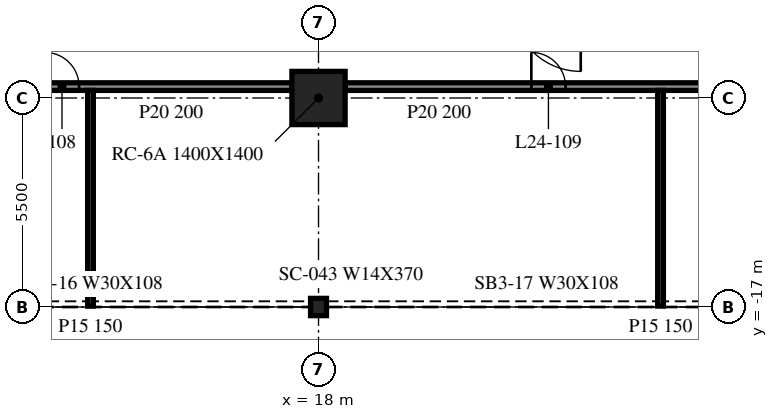
"""IFC4 building model, lengths in metres.
Left out: names, types, materials, properties, quantities, classifications, styles, units other than length and angle.
Written with IfcOpenShell. Run it as: python <this file> out.ifc"""

import sys

from ifc_helpers import new_model, si_unit, direction, frame, frame_2d, origin, origin_2d, place, context, subcontext, project, spatial, rectangle, i_section, extrude, element, fill, save


model = new_model("IFC4")
c1 = context("Model", 3, precision=1e-05, world=origin(), true_north=direction((0.0, 1.0)))
c2 = subcontext(c1, "Body", "Model", "MODEL_VIEW")
j1 = project(units=[si_unit("LENGTHUNIT", "METRE"), si_unit("PLANEANGLEUNIT", "RADIAN")], contexts=[c1])
p1 = place(None, origin())
s1 = spatial("IfcSite", under=j1, at=p1, CompositionType="ELEMENT")
p2 = place(p1, origin())
s2 = spatial("IfcBuilding", under=s1, at=p2, CompositionType="ELEMENT")
p3 = place(p2, frame((0.0, 0.0, 105.3)))
s3 = spatial("IfcBuildingStorey", under=s2, at=p3, CompositionType="ELEMENT", Elevation=105.3)
p4 = place(p3, frame((18.0, -11.5, -0.34), z_axis=(0.0, 0.0, 1.0), x_axis=(1.0, 0.0, 0.0)))
e1 = element("IfcColumn", 1, at=p4, inside=s3, PredefinedType="COLUMN", context=c2, shape_type="SweptSolid", body=[
    extrude(rectangle(XDim=1.4, YDim=1.4, at=origin_2d()), origin(), (0.0, 0.0, 1.0), 4.1),
])
p5 = place(p3, frame((18.0, -17.0, -0.34), z_axis=(0.0, 0.0, 1.0), x_axis=(1.0, 0.0, 0.0)))
e2 = element("IfcColumn", 2, at=p5, inside=s3, PredefinedType="COLUMN", context=c2, shape_type="SweptSolid", body=[
    extrude(i_section(OverallWidth=0.419, OverallDepth=0.455, WebThickness=0.042, FlangeThickness=0.068, at=origin_2d()), origin(), (0.0, 0.0, 1.0), 4.1),
])
p6 = place(p3, frame((6.7, -11.2, 0.0), z_axis=(0.0, 0.0, 1.0), x_axis=(1.0, 0.0, 0.0)))
e3 = element("IfcWall", 3, at=p6, inside=s3, PredefinedType="PARTITIONING", context=c2, shape_type="SweptSolid", body=[
    extrude(rectangle(XDim=10.6, YDim=0.2, at=frame_2d((5.3, 0.0))), origin(), (0.0, 0.0, 1.0), 3.76),
])
p7 = place(p6, frame((1.1, 0.0, 0.0)))
e4 = element("IfcOpeningElement", 4, at=p7, cuts=e3, PredefinedType="OPENING", context=c2, shape_type="SweptSolid", body=[
    extrude(rectangle(XDim=0.9, YDim=2.1, at=frame_2d((0.45, 1.05))), frame((0.0, 0.11, 0.0), z_axis=(0.0, -1.0, 0.0), x_axis=(1.0, 0.0, 0.0)), (0.0, 0.0, 1.0), 0.22),
])
p8 = place(p6, frame((4.1, 0.0, 0.0)))
e5 = element("IfcOpeningElement", 5, at=p8, cuts=e3, PredefinedType="OPENING", context=c2, shape_type="SweptSolid", body=[
    extrude(rectangle(XDim=0.9, YDim=2.1, at=frame_2d((0.45, 1.05))), frame((0.0, 0.11, 0.0), z_axis=(0.0, -1.0, 0.0), x_axis=(1.0, 0.0, 0.0)), (0.0, 0.0, 1.0), 0.22),
])
p9 = place(p3, frame((18.7, -11.2, 0.0), z_axis=(0.0, 0.0, 1.0), x_axis=(1.0, 0.0, 0.0)))
e6 = element("IfcWall", 6, at=p9, inside=s3, PredefinedType="PARTITIONING", context=c2, shape_type="SweptSolid", body=[
    extrude(rectangle(XDim=10.6, YDim=0.2, at=frame_2d((5.3, 0.0))), origin(), (0.0, 0.0, 1.0), 3.76),
])
p10 = place(p9, frame((4.9, 0.0, 0.0)))
e7 = element("IfcOpeningElement", 7, at=p10, cuts=e6, PredefinedType="OPENING", context=c2, shape_type="SweptSolid", body=[
    extrude(rectangle(XDim=0.9, YDim=2.1, at=frame_2d((0.45, 1.05))), frame((0.0, 0.11, 0.0), z_axis=(0.0, -1.0, 0.0), x_axis=(1.0, 0.0, 0.0)), (0.0, 0.0, 1.0), 0.22),
])
for number, where, z_axis, x_axis in (
    (8, (12.0, -16.975, 0.0), (0.0, 0.0, 1.0), (0.0, 1.0, 0.0)),
    (9, (27.0, -16.975, 0.0), (0.0, 0.0, 1.0), (0.0, 1.0, 0.0)),
):
    element("IfcWall", number, at=place(p3, frame(where, z_axis=z_axis, x_axis=x_axis)), inside=s3, PredefinedType="PARTITIONING", context=c2, shape_type="SweptSolid", body=[
        extrude(rectangle(XDim=5.675, YDim=0.15, at=frame_2d((2.837, 0.0))), origin(), (0.0, 0.0, 1.0), 3.76),
    ])
p11 = place(p8, origin())
e10 = element("IfcDoor", 10, at=p11, inside=s3, OperationType="SINGLE_SWING_RIGHT", PredefinedType="DOOR", context=c2, shape_type="SweptSolid", body=[
    extrude(rectangle(XDim=0.9, YDim=2.1, at=frame_2d((0.45, 1.05))), frame((0.0, 0.025, 0.0), z_axis=(0.0, -1.0, 0.0), x_axis=(1.0, 0.0, 0.0)), (0.0, 0.0, 1.0), 0.05),
])
fill(e5, e10)
p12 = place(p10, origin())
e11 = element("IfcDoor", 11, at=p12, inside=s3, OperationType="SINGLE_SWING_LEFT", PredefinedType="DOOR", context=c2, shape_type="SweptSolid", body=[
    extrude(rectangle(XDim=0.9, YDim=2.1, at=frame_2d((0.45, 1.05))), frame((0.0, 0.025, 0.0), z_axis=(0.0, -1.0, 0.0), x_axis=(1.0, 0.0, 0.0)), (0.0, 0.0, 1.0), 0.05),
])
fill(e7, e11)
save(model, sys.argv[1])
